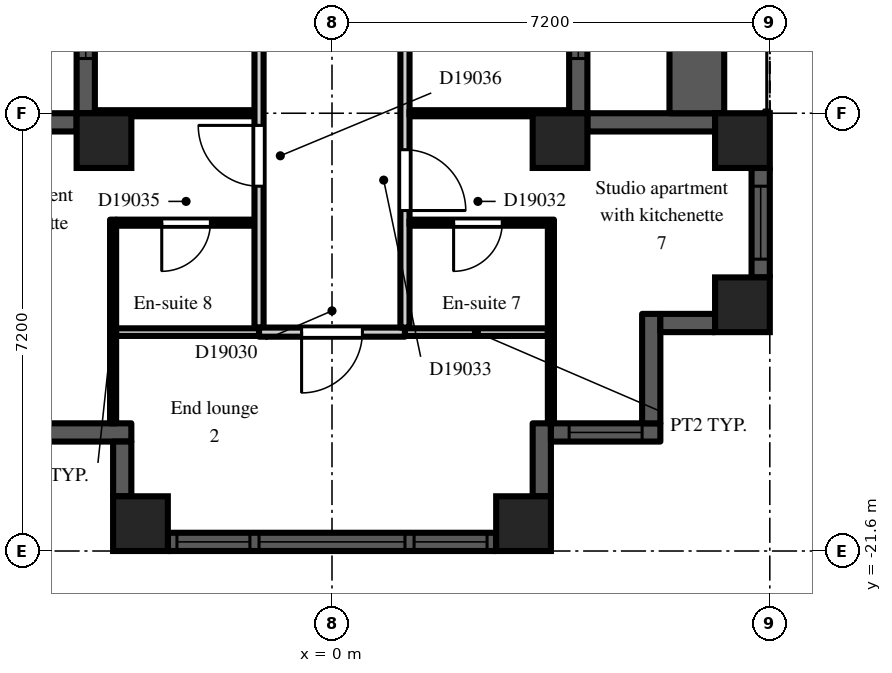
"""IFC4 building model, lengths in metres.
Left out: names, types, materials, properties, quantities, classifications, styles, units other than length and angle.
Written with IfcOpenShell. Run it as: python <this file> out.ifc"""

import sys

from ifc_helpers import new_model, si_unit, direction, frame, frame_2d, origin, origin_2d, place, context, subcontext, project, spatial, rectangle, extrude, element, fill, save


model = new_model("IFC4")
c1 = context("Model", 3, precision=1e-05, world=origin(), true_north=direction((0.0, 1.0)))
c2 = subcontext(c1, "Body", "Model", "MODEL_VIEW")
j1 = project(units=[si_unit("LENGTHUNIT", "METRE"), si_unit("PLANEANGLEUNIT", "RADIAN")], contexts=[c1])
p1 = place(None, origin())
s1 = spatial("IfcSite", under=j1, at=p1, CompositionType="ELEMENT")
p2 = place(p1, origin())
s2 = spatial("IfcBuilding", under=s1, at=p2, CompositionType="ELEMENT")
p3 = place(p2, frame((0.0, 0.0, 129.3)))
s3 = spatial("IfcBuildingStorey", under=s2, at=p3, CompositionType="ELEMENT", Elevation=129.3)
for number, where, z_axis, x_axis in (
    (1, (-3.75, -14.85, 0.0), (0.0, 0.0, 1.0), (1.0, 0.0, 0.0)),
    (2, (-3.15, -21.15, 0.0), (0.0, 0.0, 1.0), (1.0, 0.0, 0.0)),
    (3, (3.15, -21.15, 0.0), (0.0, 0.0, 1.0), (1.0, 0.0, 0.0)),
    (4, (3.75, -14.85, 0.0), (0.0, 0.0, 1.0), (1.0, 0.0, 0.0)),
    (5, (6.75, -17.55, 0.0), (0.0, 0.0, 1.0), (1.0, 0.0, 0.0)),
    (6, (6.75, -14.85, 0.0), (0.0, 0.0, 1.0), (1.0, 0.0, 0.0)),
):
    element("IfcColumn", number, at=place(p3, frame(where, z_axis=z_axis, x_axis=x_axis)), inside=s3, PredefinedType="COLUMN", context=c2, shape_type="SweptSolid", body=[
        extrude(rectangle(XDim=0.9, YDim=0.9, at=origin_2d()), origin(), (0.0, 0.0, 1.0), 3.0),
    ])
p4 = place(p3, frame((-4.05, -7.2, 0.0), z_axis=(0.0, 0.0, 1.0), x_axis=(0.0, -1.0, 0.0)))
e7 = element("IfcWall", 7, at=p4, inside=s3, PredefinedType="SOLIDWALL", context=c2, shape_type="SweptSolid", body=[
    extrude(rectangle(XDim=7.2, YDim=0.3, at=frame_2d((3.6, 0.0))), origin(), (0.0, 0.0, 1.0), 2.2),
])
p5 = place(p4, frame((3.0, 0.0, 0.0)))
e8 = element("IfcOpeningElement", 8, at=p5, cuts=e7, PredefinedType="OPENING", context=c2, shape_type="SweptSolid", body=[
    extrude(rectangle(XDim=1.2, YDim=2.05, at=frame_2d((0.6, 1.025))), frame((0.0, 0.16, 0.0), z_axis=(0.0, -1.0, 0.0), x_axis=(1.0, 0.0, 0.0)), (0.0, 0.0, 1.0), 0.32),
])
p6 = place(p4, frame((0.9, 0.0, 0.2)))
e9 = element("IfcOpeningElement", 9, at=p6, cuts=e7, PredefinedType="OPENING", context=c2, shape_type="SweptSolid", body=[
    extrude(rectangle(XDim=1.8, YDim=1.85, at=frame_2d((0.9, 0.925))), frame((0.0, 0.16, 0.0), z_axis=(0.0, -1.0, 0.0), x_axis=(1.0, 0.0, 0.0)), (0.0, 0.0, 1.0), 0.32),
])
p7 = place(p4, frame((4.5, 0.0, 0.2)))
e10 = element("IfcOpeningElement", 10, at=p7, cuts=e7, PredefinedType="OPENING", context=c2, shape_type="SweptSolid", body=[
    extrude(rectangle(XDim=1.8, YDim=1.85, at=frame_2d((0.9, 0.925))), frame((0.0, 0.16, 0.0), z_axis=(0.0, -1.0, 0.0), x_axis=(1.0, 0.0, 0.0)), (0.0, 0.0, 1.0), 0.32),
])
p8 = place(p3, frame((-4.2, -14.55, 0.0), z_axis=(0.0, 0.0, 1.0), x_axis=(-1.0, 0.0, 0.0)))
e11 = element("IfcWall", 11, at=p8, inside=s3, PredefinedType="SOLIDWALL", context=c2, shape_type="SweptSolid", body=[
    extrude(rectangle(XDim=2.1, YDim=0.3, at=frame_2d((1.05, 0.0))), origin(), (0.0, 0.0, 1.0), 2.2),
])
p9 = place(p3, frame((-5.1, -19.65, 0.0), z_axis=(0.0, 0.0, 1.0), x_axis=(1.0, 0.0, 0.0)))
e12 = element("IfcWall", 12, at=p9, inside=s3, PredefinedType="SOLIDWALL", context=c2, shape_type="SweptSolid", body=[
    extrude(rectangle(XDim=1.8, YDim=0.3, at=frame_2d((0.9, 0.0))), origin(), (0.0, 0.0, 1.0), 2.6),
])
p10 = place(p3, frame((-3.45, -19.8, 0.0), z_axis=(0.0, 0.0, 1.0), x_axis=(0.0, -1.0, 0.0)))
e13 = element("IfcWall", 13, at=p10, inside=s3, PredefinedType="SOLIDWALL", context=c2, shape_type="SweptSolid", body=[
    extrude(rectangle(XDim=0.9, YDim=0.3, at=frame_2d((0.45, 0.0))), origin(), (0.0, 0.0, 1.0), 2.6),
])
p11 = place(p3, frame((-2.7, -21.45, 0.0), z_axis=(0.0, 0.0, 1.0), x_axis=(1.0, 0.0, 0.0)))
e14 = element("IfcWall", 14, at=p11, inside=s3, PredefinedType="SOLIDWALL", context=c2, shape_type="SweptSolid", body=[
    extrude(rectangle(XDim=5.4, YDim=0.3, at=frame_2d((2.7, 0.0))), origin(), (0.0, 0.0, 1.0), 2.2),
])
p12 = place(p11, frame((1.5, 0.0, 0.2)))
e15 = element("IfcOpeningElement", 15, at=p12, cuts=e14, PredefinedType="OPENING", context=c2, shape_type="SweptSolid", body=[
    extrude(rectangle(XDim=2.4, YDim=1.85, at=frame_2d((1.2, 0.925))), frame((0.0, 0.16, 0.0), z_axis=(0.0, -1.0, 0.0), x_axis=(1.0, 0.0, 0.0)), (0.0, 0.0, 1.0), 0.32),
])
p13 = place(p11, frame((0.15, 0.0, 0.2)))
e16 = element("IfcOpeningElement", 16, at=p13, cuts=e14, PredefinedType="OPENING", context=c2, shape_type="SweptSolid", body=[
    extrude(rectangle(XDim=1.2, YDim=1.85, at=frame_2d((0.6, 0.925))), frame((0.0, 0.16, 0.0), z_axis=(0.0, -1.0, 0.0), x_axis=(1.0, 0.0, 0.0)), (0.0, 0.0, 1.0), 0.32),
])
p14 = place(p11, frame((4.05, 0.0, 0.2)))
e17 = element("IfcOpeningElement", 17, at=p14, cuts=e14, PredefinedType="OPENING", context=c2, shape_type="SweptSolid", body=[
    extrude(rectangle(XDim=1.2, YDim=1.85, at=frame_2d((0.6, 0.925))), frame((0.0, 0.16, 0.0), z_axis=(0.0, -1.0, 0.0), x_axis=(1.0, 0.0, 0.0)), (0.0, 0.0, 1.0), 0.32),
])
p15 = place(p3, frame((3.45, -20.7, 0.0), z_axis=(0.0, 0.0, 1.0), x_axis=(0.0, 1.0, 0.0)))
e18 = element("IfcWall", 18, at=p15, inside=s3, PredefinedType="SOLIDWALL", context=c2, shape_type="SweptSolid", body=[
    extrude(rectangle(XDim=1.2, YDim=0.3, at=frame_2d((0.6, 0.0))), origin(), (0.0, 0.0, 1.0), 2.6),
])
p16 = place(p3, frame((3.6, -19.65, 0.0), z_axis=(0.0, 0.0, 1.0), x_axis=(1.0, 0.0, 0.0)))
e19 = element("IfcWall", 19, at=p16, inside=s3, PredefinedType="SOLIDWALL", context=c2, shape_type="SweptSolid", body=[
    extrude(rectangle(XDim=1.8, YDim=0.3, at=frame_2d((0.9, 0.0))), origin(), (0.0, 0.0, 1.0), 2.6),
])
p17 = place(p16, frame((0.3, 0.0, 0.2)))
e20 = element("IfcOpeningElement", 20, at=p17, cuts=e19, PredefinedType="OPENING", context=c2, shape_type="SweptSolid", body=[
    extrude(rectangle(XDim=1.2, YDim=1.85, at=frame_2d((0.6, 0.925))), frame((0.0, 0.16, 0.0), z_axis=(0.0, -1.0, 0.0), x_axis=(1.0, 0.0, 0.0)), (0.0, 0.0, 1.0), 0.32),
])
p18 = place(p3, frame((5.25, -19.5, 0.0), z_axis=(0.0, 0.0, 1.0), x_axis=(0.0, 1.0, 0.0)))
e21 = element("IfcWall", 21, at=p18, inside=s3, PredefinedType="SOLIDWALL", context=c2, shape_type="SweptSolid", body=[
    extrude(rectangle(XDim=1.8, YDim=0.3, at=frame_2d((0.9, 0.0))), origin(), (0.0, 0.0, 1.0), 2.6),
])
p19 = place(p3, frame((5.4, -17.85, 0.0), z_axis=(0.0, 0.0, 1.0), x_axis=(1.0, 0.0, 0.0)))
e22 = element("IfcWall", 22, at=p19, inside=s3, PredefinedType="SOLIDWALL", context=c2, shape_type="SweptSolid", body=[
    extrude(rectangle(XDim=0.9, YDim=0.3, at=frame_2d((0.45, 0.0))), origin(), (0.0, 0.0, 1.0), 2.6),
])
p20 = place(p3, frame((7.05, -17.1, 0.0), z_axis=(0.0, 0.0, 1.0), x_axis=(0.0, 1.0, 0.0)))
e23 = element("IfcWall", 23, at=p20, inside=s3, PredefinedType="SOLIDWALL", context=c2, shape_type="SweptSolid", body=[
    extrude(rectangle(XDim=1.8, YDim=0.3, at=frame_2d((0.9, 0.0))), origin(), (0.0, 0.0, 1.0), 2.2),
])
p21 = place(p20, frame((0.3, 0.0, 0.2)))
e24 = element("IfcOpeningElement", 24, at=p21, cuts=e23, PredefinedType="OPENING", context=c2, shape_type="SweptSolid", body=[
    extrude(rectangle(XDim=1.2, YDim=1.85, at=frame_2d((0.6, 0.925))), frame((0.0, 0.16, 0.0), z_axis=(0.0, -1.0, 0.0), x_axis=(1.0, 0.0, 0.0)), (0.0, 0.0, 1.0), 0.32),
])
p22 = place(p3, frame((6.3, -14.55, 0.0), z_axis=(0.0, 0.0, 1.0), x_axis=(-1.0, 0.0, 0.0)))
e25 = element("IfcWall", 25, at=p22, inside=s3, PredefinedType="SOLIDWALL", context=c2, shape_type="SweptSolid", body=[
    extrude(rectangle(XDim=2.1, YDim=0.3, at=frame_2d((1.05, 0.0))), origin(), (0.0, 0.0, 1.0), 2.2),
])
p23 = place(p3, frame((4.05, -14.4, 0.0), z_axis=(0.0, 0.0, 1.0), x_axis=(0.0, 1.0, 0.0)))
e26 = element("IfcWall", 26, at=p23, inside=s3, PredefinedType="SOLIDWALL", context=c2, shape_type="SweptSolid", body=[
    extrude(rectangle(XDim=7.2, YDim=0.3, at=frame_2d((3.6, 0.0))), origin(), (0.0, 0.0, 1.0), 2.2),
])
p24 = place(p23, frame((3.0, 0.0, 0.0)))
e27 = element("IfcOpeningElement", 27, at=p24, cuts=e26, PredefinedType="OPENING", context=c2, shape_type="SweptSolid", body=[
    extrude(rectangle(XDim=1.2, YDim=2.05, at=frame_2d((0.6, 1.025))), frame((0.0, 0.16, 0.0), z_axis=(0.0, -1.0, 0.0), x_axis=(1.0, 0.0, 0.0)), (0.0, 0.0, 1.0), 0.32),
])
p25 = place(p23, frame((0.9, 0.0, 0.2)))
e28 = element("IfcOpeningElement", 28, at=p25, cuts=e26, PredefinedType="OPENING", context=c2, shape_type="SweptSolid", body=[
    extrude(rectangle(XDim=1.8, YDim=1.85, at=frame_2d((0.9, 0.925))), frame((0.0, 0.16, 0.0), z_axis=(0.0, -1.0, 0.0), x_axis=(1.0, 0.0, 0.0)), (0.0, 0.0, 1.0), 0.32),
])
p26 = place(p23, frame((4.5, 0.0, 0.2)))
e29 = element("IfcOpeningElement", 29, at=p26, cuts=e26, PredefinedType="OPENING", context=c2, shape_type="SweptSolid", body=[
    extrude(rectangle(XDim=1.8, YDim=1.85, at=frame_2d((0.9, 0.925))), frame((0.0, 0.16, 0.0), z_axis=(0.0, -1.0, 0.0), x_axis=(1.0, 0.0, 0.0)), (0.0, 0.0, 1.0), 0.32),
])
p27 = place(p3, frame((6.0, -14.4, 0.0), z_axis=(0.0, 0.0, 1.0), x_axis=(0.0, 1.0, 0.0)))
e30 = element("IfcWall", 30, at=p27, inside=s3, PredefinedType="PARAPET", context=c2, shape_type="SweptSolid", body=[
    extrude(rectangle(XDim=7.2, YDim=0.9, at=frame_2d((3.6, 0.0))), origin(), (0.0, 0.0, 1.0), 0.8),
])
p28 = place(p3, frame((-3.9, -14.4, 0.0), z_axis=(0.0, 0.0, 1.0), x_axis=(1.0, 0.0, 0.0)))
e31 = element("IfcWall", 31, at=p28, inside=s3, PredefinedType="PARTITIONING", context=c2, shape_type="SweptSolid", body=[
    extrude(rectangle(XDim=2.625, YDim=0.1, at=frame_2d((1.312, 0.0))), origin(), (0.0, 0.0, 1.0), 2.6),
])
p29 = place(p3, frame((-3.6, -19.5, 0.0), z_axis=(0.0, 0.0, 1.0), x_axis=(0.0, 1.0, 0.0)))
e32 = element("IfcWall", 32, at=p29, inside=s3, PredefinedType="PARTITIONING", context=c2, shape_type="SweptSolid", body=[
    extrude(rectangle(XDim=3.35, YDim=0.1, at=frame_2d((1.675, 0.0))), origin(), (0.0, 0.0, 1.0), 2.6),
])
p30 = place(p3, frame((-3.55, -18.0, 0.0), z_axis=(0.0, 0.0, 1.0), x_axis=(1.0, 0.0, 0.0)))
e33 = element("IfcWall", 33, at=p30, inside=s3, PredefinedType="PARTITIONING", context=c2, shape_type="SweptSolid", body=[
    extrude(rectangle(XDim=2.35, YDim=0.125, at=frame_2d((1.175, 0.0))), origin(), (0.0, 0.0, 1.0), 2.6),
])
p31 = place(p3, frame((-3.55, -16.2, 0.0), z_axis=(0.0, 0.0, 1.0), x_axis=(1.0, 0.0, 0.0)))
e34 = element("IfcWall", 34, at=p31, inside=s3, PredefinedType="PARTITIONING", context=c2, shape_type="SweptSolid", body=[
    extrude(rectangle(XDim=2.275, YDim=0.1, at=frame_2d((1.138, 0.0))), origin(), (0.0, 0.0, 1.0), 2.6),
])
p32 = place(p31, frame((0.75, 0.0, 0.0)))
e35 = element("IfcOpeningElement", 35, at=p32, cuts=e34, PredefinedType="OPENING", context=c2, shape_type="SweptSolid", body=[
    extrude(rectangle(XDim=0.8, YDim=2.1, at=frame_2d((0.4, 1.05))), frame((0.0, 0.06, 0.0), z_axis=(0.0, -1.0, 0.0), x_axis=(1.0, 0.0, 0.0)), (0.0, 0.0, 1.0), 0.12),
])
p33 = place(p3, frame((-1.2, -17.925, 0.0), z_axis=(0.0, 0.0, 1.0), x_axis=(0.0, 1.0, 0.0)))
e36 = element("IfcWall", 36, at=p33, inside=s3, PredefinedType="PARTITIONING", context=c2, shape_type="SweptSolid", body=[
    extrude(rectangle(XDim=10.65, YDim=0.15, at=frame_2d((5.325, 0.0))), origin(), (0.0, 0.0, 1.0), 2.6),
])
p34 = place(p33, frame((8.475, 0.0, 0.0)))
e37 = element("IfcOpeningElement", 37, at=p34, cuts=e36, PredefinedType="OPENING", context=c2, shape_type="SweptSolid", body=[
    extrude(rectangle(XDim=0.9, YDim=2.1, at=frame_2d((0.45, 1.05))), frame((0.0, 0.085, 0.0), z_axis=(0.0, -1.0, 0.0), x_axis=(1.0, 0.0, 0.0)), (0.0, 0.0, 1.0), 0.17),
])
p35 = place(p33, frame((2.325, 0.0, 0.0)))
e38 = element("IfcOpeningElement", 38, at=p35, cuts=e36, PredefinedType="OPENING", context=c2, shape_type="SweptSolid", body=[
    extrude(rectangle(XDim=1.0, YDim=2.1, at=frame_2d((0.5, 1.05))), frame((0.0, 0.085, 0.0), z_axis=(0.0, -1.0, 0.0), x_axis=(1.0, 0.0, 0.0)), (0.0, 0.0, 1.0), 0.17),
])
p36 = place(p3, frame((-1.2, -18.0, 0.0), z_axis=(0.0, 0.0, 1.0), x_axis=(1.0, 0.0, 0.0)))
e39 = element("IfcWall", 39, at=p36, inside=s3, PredefinedType="PARTITIONING", context=c2, shape_type="SweptSolid", body=[
    extrude(rectangle(XDim=2.4, YDim=0.15, at=frame_2d((1.2, 0.0))), origin(), (0.0, 0.0, 1.0), 2.6),
])
p37 = place(p36, frame((0.7, 0.0, 0.0)))
e40 = element("IfcOpeningElement", 40, at=p37, cuts=e39, PredefinedType="OPENING", context=c2, shape_type="SweptSolid", body=[
    extrude(rectangle(XDim=1.0, YDim=2.1, at=frame_2d((0.5, 1.05))), frame((0.0, 0.085, 0.0), z_axis=(0.0, -1.0, 0.0), x_axis=(1.0, 0.0, 0.0)), (0.0, 0.0, 1.0), 0.17),
])
p38 = place(p3, frame((1.2, -17.925, 0.0), z_axis=(0.0, 0.0, 1.0), x_axis=(0.0, 1.0, 0.0)))
e41 = element("IfcWall", 41, at=p38, inside=s3, PredefinedType="PARTITIONING", context=c2, shape_type="SweptSolid", body=[
    extrude(rectangle(XDim=10.8, YDim=0.15, at=frame_2d((5.4, 0.0))), origin(), (0.0, 0.0, 1.0), 2.6),
])
p39 = place(p38, frame((4.875, 0.0, 0.0)))
e42 = element("IfcOpeningElement", 42, at=p39, cuts=e41, PredefinedType="OPENING", context=c2, shape_type="SweptSolid", body=[
    extrude(rectangle(XDim=0.9, YDim=2.1, at=frame_2d((0.45, 1.05))), frame((0.0, 0.085, 0.0), z_axis=(0.0, -1.0, 0.0), x_axis=(1.0, 0.0, 0.0)), (0.0, 0.0, 1.0), 0.17),
])
p40 = place(p38, frame((1.925, 0.0, 0.0)))
e43 = element("IfcOpeningElement", 43, at=p40, cuts=e41, PredefinedType="OPENING", context=c2, shape_type="SweptSolid", body=[
    extrude(rectangle(XDim=1.0, YDim=2.1, at=frame_2d((0.5, 1.05))), frame((0.0, 0.085, 0.0), z_axis=(0.0, -1.0, 0.0), x_axis=(1.0, 0.0, 0.0)), (0.0, 0.0, 1.0), 0.17),
])
p41 = place(p3, frame((1.2, -18.0, 0.0), z_axis=(0.0, 0.0, 1.0), x_axis=(1.0, 0.0, 0.0)))
e44 = element("IfcWall", 44, at=p41, inside=s3, PredefinedType="PARTITIONING", context=c2, shape_type="SweptSolid", body=[
    extrude(rectangle(XDim=2.35, YDim=0.125, at=frame_2d((1.175, 0.0))), origin(), (0.0, 0.0, 1.0), 2.6),
])
p42 = place(p3, frame((1.275, -16.2, 0.0), z_axis=(0.0, 0.0, 1.0), x_axis=(1.0, 0.0, 0.0)))
e45 = element("IfcWall", 45, at=p42, inside=s3, PredefinedType="PARTITIONING", context=c2, shape_type="SweptSolid", body=[
    extrude(rectangle(XDim=2.375, YDim=0.1, at=frame_2d((1.188, 0.0))), origin(), (0.0, 0.0, 1.0), 2.6),
])
p43 = place(p42, frame((0.725, 0.0, 0.0)))
e46 = element("IfcOpeningElement", 46, at=p43, cuts=e45, PredefinedType="OPENING", context=c2, shape_type="SweptSolid", body=[
    extrude(rectangle(XDim=0.8, YDim=2.1, at=frame_2d((0.4, 1.05))), frame((0.0, 0.06, 0.0), z_axis=(0.0, -1.0, 0.0), x_axis=(1.0, 0.0, 0.0)), (0.0, 0.0, 1.0), 0.12),
])
p44 = place(p3, frame((1.275, -14.4, 0.0), z_axis=(0.0, 0.0, 1.0), x_axis=(1.0, 0.0, 0.0)))
e47 = element("IfcWall", 47, at=p44, inside=s3, PredefinedType="PARTITIONING", context=c2, shape_type="SweptSolid", body=[
    extrude(rectangle(XDim=2.625, YDim=0.1, at=frame_2d((1.312, 0.0))), origin(), (0.0, 0.0, 1.0), 2.6),
])
p45 = place(p3, frame((3.6, -19.5, 0.0), z_axis=(0.0, 0.0, 1.0), x_axis=(0.0, 1.0, 0.0)))
e48 = element("IfcWall", 48, at=p45, inside=s3, PredefinedType="PARTITIONING", context=c2, shape_type="SweptSolid", body=[
    extrude(rectangle(XDim=3.25, YDim=0.1, at=frame_2d((1.625, 0.0))), origin(), (0.0, 0.0, 1.0), 2.6),
])
p46 = place(p7, origin())
e49 = element("IfcWindow", 49, at=p46, inside=s3, PartitioningType="SINGLE_PANEL", PredefinedType="WINDOW", context=c2, shape_type="SweptSolid", body=[
    extrude(rectangle(XDim=1.8, YDim=1.85, at=frame_2d((0.9, 0.925))), frame((0.0, 0.03, 0.0), z_axis=(0.0, -1.0, 0.0), x_axis=(1.0, 0.0, 0.0)), (0.0, 0.0, 1.0), 0.06),
])
fill(e10, e49)
p47 = place(p12, origin())
e50 = element("IfcWindow", 50, at=p47, inside=s3, PartitioningType="SINGLE_PANEL", PredefinedType="WINDOW", context=c2, shape_type="SweptSolid", body=[
    extrude(rectangle(XDim=2.4, YDim=1.85, at=frame_2d((1.2, 0.925))), frame((0.0, 0.03, 0.0), z_axis=(0.0, -1.0, 0.0), x_axis=(1.0, 0.0, 0.0)), (0.0, 0.0, 1.0), 0.06),
])
fill(e15, e50)
p48 = place(p13, origin())
e51 = element("IfcWindow", 51, at=p48, inside=s3, PartitioningType="SINGLE_PANEL", PredefinedType="WINDOW", context=c2, shape_type="SweptSolid", body=[
    extrude(rectangle(XDim=1.2, YDim=1.85, at=frame_2d((0.6, 0.925))), frame((0.0, 0.03, 0.0), z_axis=(0.0, -1.0, 0.0), x_axis=(1.0, 0.0, 0.0)), (0.0, 0.0, 1.0), 0.06),
])
fill(e16, e51)
p49 = place(p14, origin())
e52 = element("IfcWindow", 52, at=p49, inside=s3, PartitioningType="SINGLE_PANEL", PredefinedType="WINDOW", context=c2, shape_type="SweptSolid", body=[
    extrude(rectangle(XDim=1.2, YDim=1.85, at=frame_2d((0.6, 0.925))), frame((0.0, 0.03, 0.0), z_axis=(0.0, -1.0, 0.0), x_axis=(1.0, 0.0, 0.0)), (0.0, 0.0, 1.0), 0.06),
])
fill(e17, e52)
p50 = place(p17, origin())
e53 = element("IfcWindow", 53, at=p50, inside=s3, PartitioningType="SINGLE_PANEL", PredefinedType="WINDOW", context=c2, shape_type="SweptSolid", body=[
    extrude(rectangle(XDim=1.2, YDim=1.85, at=frame_2d((0.6, 0.925))), frame((0.0, 0.03, 0.0), z_axis=(0.0, -1.0, 0.0), x_axis=(1.0, 0.0, 0.0)), (0.0, 0.0, 1.0), 0.06),
])
fill(e20, e53)
p51 = place(p21, origin())
e54 = element("IfcWindow", 54, at=p51, inside=s3, PartitioningType="SINGLE_PANEL", PredefinedType="WINDOW", context=c2, shape_type="SweptSolid", body=[
    extrude(rectangle(XDim=1.2, YDim=1.85, at=frame_2d((0.6, 0.925))), frame((0.0, 0.03, 0.0), z_axis=(0.0, -1.0, 0.0), x_axis=(1.0, 0.0, 0.0)), (0.0, 0.0, 1.0), 0.06),
])
fill(e24, e54)
p52 = place(p25, origin())
e55 = element("IfcWindow", 55, at=p52, inside=s3, PartitioningType="SINGLE_PANEL", PredefinedType="WINDOW", context=c2, shape_type="SweptSolid", body=[
    extrude(rectangle(XDim=1.8, YDim=1.85, at=frame_2d((0.9, 0.925))), frame((0.0, 0.03, 0.0), z_axis=(0.0, -1.0, 0.0), x_axis=(1.0, 0.0, 0.0)), (0.0, 0.0, 1.0), 0.06),
])
fill(e28, e55)
p53 = place(p37, frame((1.0, 0.0, 0.0), z_axis=(0.0, 0.0, 1.0), x_axis=(-1.0, 0.0, 0.0)))
e56 = element("IfcDoor", 56, at=p53, inside=s3, OperationType="SINGLE_SWING_RIGHT", PredefinedType="DOOR", context=c2, shape_type="SweptSolid", body=[
    extrude(rectangle(XDim=1.0, YDim=2.1, at=frame_2d((0.5, 1.05))), frame((0.0, 0.025, 0.0), z_axis=(0.0, -1.0, 0.0), x_axis=(1.0, 0.0, 0.0)), (0.0, 0.0, 1.0), 0.05),
])
fill(e40, e56)
p54 = place(p43, frame((0.8, 0.0, 0.0), z_axis=(0.0, 0.0, 1.0), x_axis=(-1.0, 0.0, 0.0)))
e57 = element("IfcDoor", 57, at=p54, inside=s3, OperationType="SINGLE_SWING_RIGHT", PredefinedType="DOOR", context=c2, shape_type="SweptSolid", body=[
    extrude(rectangle(XDim=0.8, YDim=2.1, at=frame_2d((0.4, 1.05))), frame((0.0, 0.025, 0.0), z_axis=(0.0, -1.0, 0.0), x_axis=(1.0, 0.0, 0.0)), (0.0, 0.0, 1.0), 0.05),
])
fill(e46, e57)
p55 = place(p40, frame((1.0, 0.0, 0.0), z_axis=(0.0, 0.0, 1.0), x_axis=(-1.0, 0.0, 0.0)))
e58 = element("IfcDoor", 58, at=p55, inside=s3, OperationType="SINGLE_SWING_RIGHT", PredefinedType="DOOR", context=c2, shape_type="SweptSolid", body=[
    extrude(rectangle(XDim=1.0, YDim=2.1, at=frame_2d((0.5, 1.05))), frame((0.0, 0.025, 0.0), z_axis=(0.0, -1.0, 0.0), x_axis=(1.0, 0.0, 0.0)), (0.0, 0.0, 1.0), 0.05),
])
fill(e43, e58)
p56 = place(p32, frame((0.8, 0.0, 0.0), z_axis=(0.0, 0.0, 1.0), x_axis=(-1.0, 0.0, 0.0)))
e59 = element("IfcDoor", 59, at=p56, inside=s3, OperationType="SINGLE_SWING_RIGHT", PredefinedType="DOOR", context=c2, shape_type="SweptSolid", body=[
    extrude(rectangle(XDim=0.8, YDim=2.1, at=frame_2d((0.4, 1.05))), frame((0.0, 0.025, 0.0), z_axis=(0.0, -1.0, 0.0), x_axis=(1.0, 0.0, 0.0)), (0.0, 0.0, 1.0), 0.05),
])
fill(e35, e59)
p57 = place(p35, origin())
e60 = element("IfcDoor", 60, at=p57, inside=s3, OperationType="SINGLE_SWING_RIGHT", PredefinedType="DOOR", context=c2, shape_type="SweptSolid", body=[
    extrude(rectangle(XDim=1.0, YDim=2.1, at=frame_2d((0.5, 1.05))), frame((0.0, 0.025, 0.0), z_axis=(0.0, -1.0, 0.0), x_axis=(1.0, 0.0, 0.0)), (0.0, 0.0, 1.0), 0.05),
])
fill(e38, e60)
save(model, sys.argv[1])
